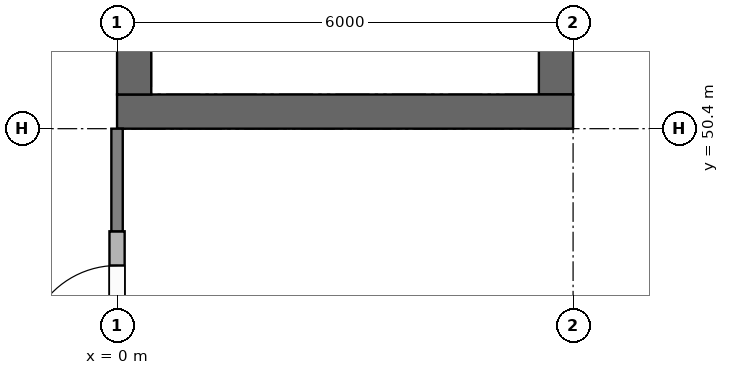
"""IFC4 building model, lengths in metres.
Left out: names, types, materials, properties, quantities, classifications, styles, units other than length and angle.
Written with IfcOpenShell. Run it as: python <this file> out.ifc"""

import sys

from ifc_helpers import new_model, si_unit, direction, frame, frame_2d, origin, place, context, subcontext, project, spatial, rectangle, extrude, element, fill, save


model = new_model("IFC4")
c1 = context("Model", 3, precision=1e-05, world=origin(), true_north=direction((0.0, 1.0)))
c2 = subcontext(c1, "Body", "Model", "MODEL_VIEW")
j1 = project(units=[si_unit("LENGTHUNIT", "METRE"), si_unit("PLANEANGLEUNIT", "RADIAN")], contexts=[c1])
p1 = place(None, origin())
s1 = spatial("IfcSite", under=j1, at=p1, CompositionType="ELEMENT")
p2 = place(p1, origin())
s2 = spatial("IfcBuilding", under=s1, at=p2, CompositionType="ELEMENT")
p3 = place(p2, frame((0.0, 0.0, 4.2)))
s3 = spatial("IfcBuildingStorey", under=s2, at=p3, CompositionType="ELEMENT", Elevation=4.2)
p4 = place(p3, frame((0.0, 50.625, 0.0), z_axis=(0.0, 0.0, 1.0), x_axis=(1.0, 0.0, 0.0)))
e1 = element("IfcWall", 1, at=p4, inside=s3, PredefinedType="SHEAR", context=c2, shape_type="SweptSolid", body=[
    extrude(rectangle(XDim=6.0, YDim=0.45, at=frame_2d((3.0, 0.0))), origin(), (0.0, 0.0, 1.0), 3.95),
])
p5 = place(p4, frame((2.4, 0.0, 0.0)))
e2 = element("IfcOpeningElement", 2, at=p5, cuts=e1, PredefinedType="OPENING", context=c2, shape_type="SweptSolid", body=[
    extrude(rectangle(XDim=1.2, YDim=2.1, at=frame_2d((0.6, 1.05))), frame((0.0, 0.235, 0.0), z_axis=(0.0, -1.0, 0.0), x_axis=(1.0, 0.0, 0.0)), (0.0, 0.0, 1.0), 0.47),
])
p6 = place(p3, frame((0.225, 50.85, 0.0), z_axis=(0.0, 0.0, 1.0), x_axis=(0.0, 1.0, 0.0)))
e3 = element("IfcWall", 3, at=p6, inside=s3, PredefinedType="SHEAR", context=c2, shape_type="SweptSolid", body=[
    extrude(rectangle(XDim=6.525, YDim=0.45, at=frame_2d((3.262, 0.0))), origin(), (0.0, 0.0, 1.0), 3.95),
])
p7 = place(p6, frame((3.85, 0.0, 0.0)))
e4 = element("IfcOpeningElement", 4, at=p7, cuts=e3, PredefinedType="OPENING", context=c2, shape_type="SweptSolid", body=[
    extrude(rectangle(XDim=1.4, YDim=2.1, at=frame_2d((0.7, 1.05))), frame((0.0, 0.235, 0.0), z_axis=(0.0, -1.0, 0.0), x_axis=(1.0, 0.0, 0.0)), (0.0, 0.0, 1.0), 0.47),
])
p8 = place(p3, frame((5.775, 50.85, 0.0), z_axis=(0.0, 0.0, 1.0), x_axis=(0.0, 1.0, 0.0)))
e5 = element("IfcWall", 5, at=p8, inside=s3, PredefinedType="SHEAR", context=c2, shape_type="SweptSolid", body=[
    extrude(rectangle(XDim=6.525, YDim=0.45, at=frame_2d((3.262, 0.0))), origin(), (0.0, 0.0, 1.0), 3.95),
])
p9 = place(p3, frame((0.0, 50.625, -0.2), z_axis=(0.0, 0.0, 1.0), x_axis=(1.0, 0.0, 0.0)))
e6 = element("IfcWall", 6, at=p9, inside=s3, PredefinedType="SOLIDWALL", context=c2, shape_type="SweptSolid", body=[
    extrude(rectangle(XDim=6.0, YDim=0.45, at=frame_2d((3.0, 0.0))), origin(), (0.0, 0.0, 1.0), 0.2),
])
for number, where, z_axis, x_axis in (
    (7, (0.225, 50.85, -0.2), (0.0, 0.0, 1.0), (0.0, 1.0, 0.0)),
    (8, (5.775, 50.85, -0.2), (0.0, 0.0, 1.0), (0.0, 1.0, 0.0)),
):
    element("IfcWall", number, at=place(p3, frame(where, z_axis=z_axis, x_axis=x_axis)), inside=s3, PredefinedType="SOLIDWALL", context=c2, shape_type="SweptSolid", body=[
        extrude(rectangle(XDim=6.525, YDim=0.45, at=frame_2d((3.262, 0.0))), origin(), (0.0, 0.0, 1.0), 0.2),
    ])
p10 = place(p3, frame((0.0, 44.35, 0.0), z_axis=(0.0, 0.0, 1.0), x_axis=(0.0, 1.0, 0.0)))
e9 = element("IfcWall", 9, at=p10, inside=s3, PredefinedType="SOLIDWALL", context=c2, shape_type="SweptSolid", body=[
    extrude(rectangle(XDim=4.7, YDim=0.2, at=frame_2d((2.35, 0.0))), origin(), (0.0, 0.0, 1.0), 3.05),
])
p11 = place(p10, frame((0.45, 0.0, 0.0)))
e10 = element("IfcOpeningElement", 10, at=p11, cuts=e9, PredefinedType="OPENING", context=c2, shape_type="SweptSolid", body=[
    extrude(rectangle(XDim=1.2, YDim=2.4, at=frame_2d((0.6, 1.2))), frame((0.0, 0.11, 0.0), z_axis=(0.0, -1.0, 0.0), x_axis=(1.0, 0.0, 0.0)), (0.0, 0.0, 1.0), 0.22),
])
p12 = place(p10, frame((3.05, 0.0, 0.0)))
e11 = element("IfcOpeningElement", 11, at=p12, cuts=e9, PredefinedType="OPENING", context=c2, shape_type="SweptSolid", body=[
    extrude(rectangle(XDim=1.2, YDim=2.4, at=frame_2d((0.6, 1.2))), frame((0.0, 0.11, 0.0), z_axis=(0.0, -1.0, 0.0), x_axis=(1.0, 0.0, 0.0)), (0.0, 0.0, 1.0), 0.22),
])
p13 = place(p12, origin())
e12 = element("IfcDoor", 12, at=p13, inside=s3, OperationType="SINGLE_SWING_LEFT", PredefinedType="DOOR", context=c2, shape_type="SweptSolid", body=[
    extrude(rectangle(XDim=1.2, YDim=2.4, at=frame_2d((0.6, 1.2))), frame((0.0, 0.025, 0.0), z_axis=(0.0, -1.0, 0.0), x_axis=(1.0, 0.0, 0.0)), (0.0, 0.0, 1.0), 0.05),
])
fill(e11, e12)
p14 = place(p5, frame((1.2, 0.0, 0.0), z_axis=(0.0, 0.0, 1.0), x_axis=(-1.0, 0.0, 0.0)))
e13 = element("IfcDoor", 13, at=p14, inside=s3, OperationType="SINGLE_SWING_RIGHT", PredefinedType="DOOR", context=c2, shape_type="SweptSolid", body=[
    extrude(rectangle(XDim=1.2, YDim=2.1, at=frame_2d((0.6, 1.05))), frame((0.0, 0.025, 0.0), z_axis=(0.0, -1.0, 0.0), x_axis=(1.0, 0.0, 0.0)), (0.0, 0.0, 1.0), 0.05),
])
fill(e2, e13)
save(model, sys.argv[1])
